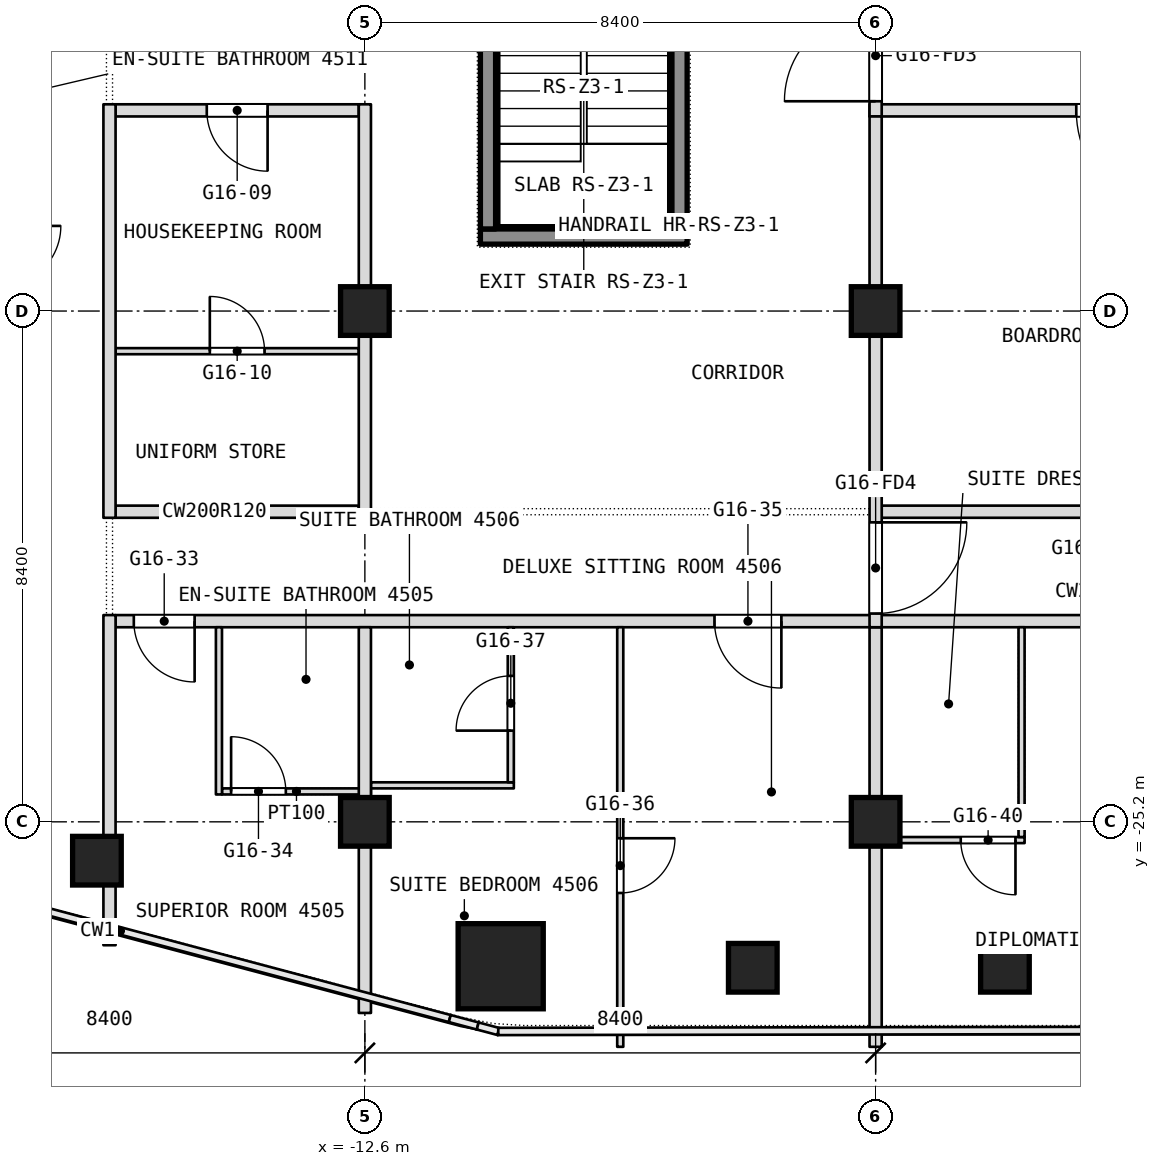
"""IFC4 building model, lengths in metres.
Left out: names, types, materials, properties, quantities, classifications, styles, units other than length and angle.
Written with IfcOpenShell. Run it as: python <this file> out.ifc"""

import sys

from ifc_helpers import new_model, si_unit, direction, frame, frame_2d, origin, origin_2d, place, context, subcontext, project, spatial, rectangle, extrude, element, fill, save


model = new_model("IFC4")
c1 = context("Model", 3, precision=1e-05, world=origin(), true_north=direction((0.0, 1.0)))
c2 = subcontext(c1, "Body", "Model", "MODEL_VIEW")
j1 = project(units=[si_unit("LENGTHUNIT", "METRE"), si_unit("PLANEANGLEUNIT", "RADIAN")], contexts=[c1])
p1 = place(None, origin())
s1 = spatial("IfcSite", under=j1, at=p1, CompositionType="ELEMENT")
p2 = place(p1, origin())
s2 = spatial("IfcBuilding", under=s1, at=p2, CompositionType="ELEMENT")
p3 = place(p2, frame((0.0, 0.0, 198.5)))
s3 = spatial("IfcBuildingStorey", under=s2, at=p3, CompositionType="ELEMENT", Elevation=198.5)
p4 = place(p3, frame((-10.366, -27.575, 0.0), z_axis=(0.0, 0.0, 1.0), x_axis=(1.0, 0.0, 0.0)))
e1 = element("IfcColumn", 1, at=p4, inside=s3, PredefinedType="COLUMN", context=c2, shape_type="SweptSolid", body=[
    extrude(rectangle(XDim=1.4, YDim=1.4, at=origin_2d()), origin(), (0.0, 0.0, 1.0), 3.6),
])
for number, where, z_axis, x_axis in (
    (2, (-12.6, -25.2, 0.0), (0.0, 0.0, 1.0), (1.0, 0.0, 0.0)),
    (3, (-12.6, -16.8, 0.0), (0.0, 0.0, 1.0), (1.0, 0.0, 0.0)),
    (4, (-4.2, -25.2, 0.0), (0.0, 0.0, 1.0), (1.0, 0.0, 0.0)),
    (5, (-4.2, -16.8, 0.0), (0.0, 0.0, 1.0), (1.0, 0.0, 0.0)),
    (6, (-2.073, -27.6, 0.0), (0.0, 0.0, 1.0), (1.0, 0.0, 0.0)),
    (7, (-6.22, -27.6, 0.0), (0.0, 0.0, 1.0), (1.0, 0.0, 0.0)),
    (8, (-17.007, -25.839, 0.0), (0.0, 0.0, 1.0), (1.0, 0.0, 0.0)),
):
    element("IfcColumn", number, at=place(p3, frame(where, z_axis=z_axis, x_axis=x_axis)), inside=s3, PredefinedType="COLUMN", context=c2, shape_type="SweptSolid", body=[
        extrude(rectangle(XDim=0.8, YDim=0.8, at=origin_2d()), origin(), (0.0, 0.0, 1.0), 3.6),
    ])
p5 = place(p3, frame((-4.1, -25.5, 0.0), z_axis=(0.0, 0.0, 1.0), x_axis=(1.0, 0.0, 0.0)))
e9 = element("IfcWall", 9, at=p5, inside=s3, PredefinedType="PARTITIONING", context=c2, shape_type="SweptSolid", body=[
    extrude(rectangle(XDim=2.35, YDim=0.1, at=frame_2d((1.175, 0.0))), origin(), (0.0, 0.0, 1.0), 3.34),
])
p6 = place(p5, frame((1.3, 0.0, 0.0)))
e10 = element("IfcOpeningElement", 10, at=p6, cuts=e9, PredefinedType="OPENING", context=c2, shape_type="SweptSolid", body=[
    extrude(rectangle(XDim=0.9, YDim=2.1, at=frame_2d((0.45, 1.05))), frame((0.0, 0.05, 0.0), z_axis=(0.0, -1.0, 0.0), x_axis=(1.0, 0.0, 0.0)), (0.0, 0.0, 1.0), 0.1),
])
p7 = place(p3, frame((-14.95, -24.7, 0.0), z_axis=(0.0, 0.0, 1.0), x_axis=(1.0, 0.0, 0.0)))
e11 = element("IfcWall", 11, at=p7, inside=s3, PredefinedType="PARTITIONING", context=c2, shape_type="SweptSolid", body=[
    extrude(rectangle(XDim=2.45, YDim=0.1, at=frame_2d((1.225, 0.0))), origin(), (0.0, 0.0, 1.0), 3.34),
])
p8 = place(p7, frame((0.15, 0.0, 0.0)))
e12 = element("IfcOpeningElement", 12, at=p8, cuts=e11, PredefinedType="OPENING", context=c2, shape_type="SweptSolid", body=[
    extrude(rectangle(XDim=0.9, YDim=2.1, at=frame_2d((0.45, 1.05))), frame((0.0, 0.05, 0.0), z_axis=(0.0, -1.0, 0.0), x_axis=(1.0, 0.0, 0.0)), (0.0, 0.0, 1.0), 0.1),
])
p9 = place(p3, frame((-12.5, -24.6, 0.0), z_axis=(0.0, 0.0, 1.0), x_axis=(1.0, 0.0, 0.0)))
e13 = element("IfcWall", 13, at=p9, inside=s3, PredefinedType="PARTITIONING", context=c2, shape_type="SweptSolid", body=[
    extrude(rectangle(XDim=2.35, YDim=0.1, at=frame_2d((1.175, 0.0))), origin(), (0.0, 0.0, 1.0), 3.34),
])
p10 = place(p3, frame((-16.7, -21.9, 0.0), z_axis=(0.0, 0.0, 1.0), x_axis=(1.0, 0.0, 0.0)))
e14 = element("IfcWall", 14, at=p10, inside=s3, PredefinedType="PARTITIONING", context=c2, shape_type="SweptSolid", body=[
    extrude(rectangle(XDim=33.4, YDim=0.2, at=frame_2d((16.7, 0.0))), origin(), (0.0, 0.0, 1.0), 3.34),
])
p11 = place(p10, frame((0.3, 0.0, 0.0)))
e15 = element("IfcOpeningElement", 15, at=p11, cuts=e14, PredefinedType="OPENING", context=c2, shape_type="SweptSolid", body=[
    extrude(rectangle(XDim=1.0, YDim=2.1, at=frame_2d((0.5, 1.05))), frame((0.0, 0.1, 0.0), z_axis=(0.0, -1.0, 0.0), x_axis=(1.0, 0.0, 0.0)), (0.0, 0.0, 1.0), 0.2),
])
p12 = place(p10, frame((9.85, 0.0, 0.0)))
e16 = element("IfcOpeningElement", 16, at=p12, cuts=e14, PredefinedType="OPENING", context=c2, shape_type="SweptSolid", body=[
    extrude(rectangle(XDim=1.1, YDim=2.1, at=frame_2d((0.55, 1.05))), frame((0.0, 0.1, 0.0), z_axis=(0.0, -1.0, 0.0), x_axis=(1.0, 0.0, 0.0)), (0.0, 0.0, 1.0), 0.2),
])
p13 = place(p10, frame((16.1, 0.0, 0.0)))
e17 = element("IfcOpeningElement", 17, at=p13, cuts=e14, PredefinedType="OPENING", context=c2, shape_type="SweptSolid", body=[
    extrude(rectangle(XDim=1.1, YDim=2.1, at=frame_2d((0.55, 1.05))), frame((0.0, 0.1, 0.0), z_axis=(0.0, -1.0, 0.0), x_axis=(1.0, 0.0, 0.0)), (0.0, 0.0, 1.0), 0.2),
])
p14 = place(p10, frame((24.6, 0.0, 0.0)))
e18 = element("IfcOpeningElement", 18, at=p14, cuts=e14, PredefinedType="OPENING", context=c2, shape_type="SweptSolid", body=[
    extrude(rectangle(XDim=1.1, YDim=2.1, at=frame_2d((0.55, 1.05))), frame((0.0, 0.1, 0.0), z_axis=(0.0, -1.0, 0.0), x_axis=(1.0, 0.0, 0.0)), (0.0, 0.0, 1.0), 0.2),
])
p15 = place(p10, frame((29.7, 0.0, 0.0)))
e19 = element("IfcOpeningElement", 19, at=p15, cuts=e14, PredefinedType="OPENING", context=c2, shape_type="SweptSolid", body=[
    extrude(rectangle(XDim=1.0, YDim=2.1, at=frame_2d((0.5, 1.05))), frame((0.0, 0.1, 0.0), z_axis=(0.0, -1.0, 0.0), x_axis=(1.0, 0.0, 0.0)), (0.0, 0.0, 1.0), 0.2),
])
p16 = place(p3, frame((-16.7, -20.1, 0.0), z_axis=(0.0, 0.0, 1.0), x_axis=(1.0, 0.0, 0.0)))
e20 = element("IfcWall", 20, at=p16, inside=s3, PredefinedType="PARTITIONING", context=c2, shape_type="SweptSolid", body=[
    extrude(rectangle(XDim=4.0, YDim=0.2, at=frame_2d((2.0, 0.0))), origin(), (0.0, 0.0, 1.0), 3.34),
])
p17 = place(p3, frame((-4.1, -20.1, 0.0), z_axis=(0.0, 0.0, 1.0), x_axis=(1.0, 0.0, 0.0)))
e21 = element("IfcWall", 21, at=p17, inside=s3, PredefinedType="PARTITIONING", context=c2, shape_type="SweptSolid", body=[
    extrude(rectangle(XDim=20.8, YDim=0.2, at=frame_2d((10.4, 0.0))), origin(), (0.0, 0.0, 1.0), 3.34),
])
p18 = place(p3, frame((-16.7, -17.46, 0.0), z_axis=(0.0, 0.0, 1.0), x_axis=(1.0, 0.0, 0.0)))
e22 = element("IfcWall", 22, at=p18, inside=s3, PredefinedType="PARTITIONING", context=c2, shape_type="SweptSolid", body=[
    extrude(rectangle(XDim=4.0, YDim=0.1, at=frame_2d((2.0, 0.0))), origin(), (0.0, 0.0, 1.0), 3.34),
])
p19 = place(p18, frame((1.55, 0.0, 0.0)))
e23 = element("IfcOpeningElement", 23, at=p19, cuts=e22, PredefinedType="OPENING", context=c2, shape_type="SweptSolid", body=[
    extrude(rectangle(XDim=0.9, YDim=2.1, at=frame_2d((0.45, 1.05))), frame((0.0, 0.05, 0.0), z_axis=(0.0, -1.0, 0.0), x_axis=(1.0, 0.0, 0.0)), (0.0, 0.0, 1.0), 0.1),
])
p20 = place(p3, frame((-16.7, -13.5, 0.0), z_axis=(0.0, 0.0, 1.0), x_axis=(1.0, 0.0, 0.0)))
e24 = element("IfcWall", 24, at=p20, inside=s3, PredefinedType="PARTITIONING", context=c2, shape_type="SweptSolid", body=[
    extrude(rectangle(XDim=4.0, YDim=0.2, at=frame_2d((2.0, 0.0))), origin(), (0.0, 0.0, 1.0), 3.34),
])
p21 = place(p20, frame((1.5, 0.0, 0.0)))
e25 = element("IfcOpeningElement", 25, at=p21, cuts=e24, PredefinedType="OPENING", context=c2, shape_type="SweptSolid", body=[
    extrude(rectangle(XDim=1.0, YDim=2.1, at=frame_2d((0.5, 1.05))), frame((0.0, 0.1, 0.0), z_axis=(0.0, -1.0, 0.0), x_axis=(1.0, 0.0, 0.0)), (0.0, 0.0, 1.0), 0.2),
])
p22 = place(p3, frame((-4.3, -13.5, 0.0), z_axis=(0.0, 0.0, 1.0), x_axis=(1.0, 0.0, 0.0)))
e26 = element("IfcWall", 26, at=p22, inside=s3, PredefinedType="PARTITIONING", context=c2, shape_type="SweptSolid", body=[
    extrude(rectangle(XDim=10.0, YDim=0.2, at=frame_2d((5.0, 0.0))), origin(), (0.0, 0.0, 1.0), 3.34),
])
p23 = place(p22, frame((3.4, 0.0, 0.0)))
e27 = element("IfcOpeningElement", 27, at=p23, cuts=e26, PredefinedType="OPENING", context=c2, shape_type="SweptSolid", body=[
    extrude(rectangle(XDim=1.8, YDim=2.1, at=frame_2d((0.9, 1.05))), frame((0.0, 0.1, 0.0), z_axis=(0.0, -1.0, 0.0), x_axis=(1.0, 0.0, 0.0)), (0.0, 0.0, 1.0), 0.2),
])
p24 = place(p22, frame((8.85, 0.0, 0.0)))
e28 = element("IfcOpeningElement", 28, at=p24, cuts=e26, PredefinedType="OPENING", context=c2, shape_type="SweptSolid", body=[
    extrude(rectangle(XDim=1.0, YDim=2.1, at=frame_2d((0.5, 1.05))), frame((0.0, 0.1, 0.0), z_axis=(0.0, -1.0, 0.0), x_axis=(1.0, 0.0, 0.0)), (0.0, 0.0, 1.0), 0.2),
])
p25 = place(p3, frame((-1.8, -25.45, 0.0), z_axis=(0.0, 0.0, 1.0), x_axis=(0.0, 1.0, 0.0)))
e29 = element("IfcWall", 29, at=p25, inside=s3, PredefinedType="PARTITIONING", context=c2, shape_type="SweptSolid", body=[
    extrude(rectangle(XDim=3.45, YDim=0.1, at=frame_2d((1.725, 0.0))), origin(), (0.0, 0.0, 1.0), 3.34),
])
p26 = place(p3, frame((-4.2, -28.9, 0.0), z_axis=(0.0, 0.0, 1.0), x_axis=(0.0, 1.0, 0.0)))
e30 = element("IfcWall", 30, at=p26, inside=s3, PredefinedType="PARTITIONING", context=c2, shape_type="SweptSolid", body=[
    extrude(rectangle(XDim=6.9, YDim=0.2, at=frame_2d((3.45, 0.0))), origin(), (0.0, 0.0, 1.0), 3.34),
])
p27 = place(p3, frame((-4.2, -13.6, 0.0), z_axis=(0.0, 0.0, 1.0), x_axis=(0.0, 1.0, 0.0)))
e31 = element("IfcWall", 31, at=p27, inside=s3, PredefinedType="PARTITIONING", context=c2, shape_type="SweptSolid", body=[
    extrude(rectangle(XDim=13.6, YDim=0.2, at=frame_2d((6.8, 0.0))), origin(), (0.0, 0.0, 1.0), 3.34),
])
p28 = place(p27, frame((11.95, 0.0, 0.0)))
e32 = element("IfcOpeningElement", 32, at=p28, cuts=e31, PredefinedType="OPENING", context=c2, shape_type="SweptSolid", body=[
    extrude(rectangle(XDim=1.5, YDim=2.1, at=frame_2d((0.75, 1.05))), frame((0.0, 0.1, 0.0), z_axis=(0.0, -1.0, 0.0), x_axis=(1.0, 0.0, 0.0)), (0.0, 0.0, 1.0), 0.2),
])
p29 = place(p27, frame((0.25, 0.0, 0.0)))
e33 = element("IfcOpeningElement", 33, at=p29, cuts=e31, PredefinedType="OPENING", context=c2, shape_type="SweptSolid", body=[
    extrude(rectangle(XDim=1.5, YDim=2.1, at=frame_2d((0.75, 1.05))), frame((0.0, 0.1, 0.0), z_axis=(0.0, -1.0, 0.0), x_axis=(1.0, 0.0, 0.0)), (0.0, 0.0, 1.0), 0.2),
])
p30 = place(p3, frame((-4.2, -22.0, 0.0), z_axis=(0.0, 0.0, 1.0), x_axis=(0.0, 1.0, 0.0)))
e34 = element("IfcWall", 34, at=p30, inside=s3, PredefinedType="PARTITIONING", context=c2, shape_type="SweptSolid", body=[
    extrude(rectangle(XDim=8.4, YDim=0.2, at=frame_2d((4.2, 0.0))), origin(), (0.0, 0.0, 1.0), 3.34),
])
p31 = place(p30, frame((0.225, 0.0, 0.0)))
e35 = element("IfcOpeningElement", 35, at=p31, cuts=e34, PredefinedType="OPENING", context=c2, shape_type="SweptSolid", body=[
    extrude(rectangle(XDim=1.5, YDim=2.1, at=frame_2d((0.75, 1.05))), frame((0.0, 0.1, 0.0), z_axis=(0.0, -1.0, 0.0), x_axis=(1.0, 0.0, 0.0)), (0.0, 0.0, 1.0), 0.2),
])
p32 = place(p3, frame((-8.4, -28.9, 0.0), z_axis=(0.0, 0.0, 1.0), x_axis=(0.0, 1.0, 0.0)))
e36 = element("IfcWall", 36, at=p32, inside=s3, PredefinedType="PARTITIONING", context=c2, shape_type="SweptSolid", body=[
    extrude(rectangle(XDim=6.9, YDim=0.1, at=frame_2d((3.45, 0.0))), origin(), (0.0, 0.0, 1.0), 3.34),
])
p33 = place(p32, frame((2.53, 0.0, 0.0)))
e37 = element("IfcOpeningElement", 37, at=p33, cuts=e36, PredefinedType="OPENING", context=c2, shape_type="SweptSolid", body=[
    extrude(rectangle(XDim=0.9, YDim=2.1, at=frame_2d((0.45, 1.05))), frame((0.0, 0.05, 0.0), z_axis=(0.0, -1.0, 0.0), x_axis=(1.0, 0.0, 0.0)), (0.0, 0.0, 1.0), 0.1),
])
p34 = place(p3, frame((-10.2, -24.55, 0.0), z_axis=(0.0, 0.0, 1.0), x_axis=(0.0, 1.0, 0.0)))
e38 = element("IfcWall", 38, at=p34, inside=s3, PredefinedType="PARTITIONING", context=c2, shape_type="SweptSolid", body=[
    extrude(rectangle(XDim=2.55, YDim=0.1, at=frame_2d((1.275, 0.0))), origin(), (0.0, 0.0, 1.0), 3.34),
])
p35 = place(p34, frame((0.85, 0.0, 0.0)))
e39 = element("IfcOpeningElement", 39, at=p35, cuts=e38, PredefinedType="OPENING", context=c2, shape_type="SweptSolid", body=[
    extrude(rectangle(XDim=0.9, YDim=2.1, at=frame_2d((0.45, 1.05))), frame((0.0, 0.05, 0.0), z_axis=(0.0, -1.0, 0.0), x_axis=(1.0, 0.0, 0.0)), (0.0, 0.0, 1.0), 0.1),
])
p36 = place(p3, frame((-12.6, -28.343, 0.0), z_axis=(0.0, 0.0, 1.0), x_axis=(0.0, 1.0, 0.0)))
e40 = element("IfcWall", 40, at=p36, inside=s3, PredefinedType="PARTITIONING", context=c2, shape_type="SweptSolid", body=[
    extrude(rectangle(XDim=6.343, YDim=0.2, at=frame_2d((3.171, 0.0))), origin(), (0.0, 0.0, 1.0), 3.34),
])
p37 = place(p3, frame((-12.6, -20.2, 0.0), z_axis=(0.0, 0.0, 1.0), x_axis=(0.0, 1.0, 0.0)))
e41 = element("IfcWall", 41, at=p37, inside=s3, PredefinedType="PARTITIONING", context=c2, shape_type="SweptSolid", body=[
    extrude(rectangle(XDim=6.8, YDim=0.2, at=frame_2d((3.4, 0.0))), origin(), (0.0, 0.0, 1.0), 3.34),
])
p38 = place(p3, frame((-15.0, -24.75, 0.0), z_axis=(0.0, 0.0, 1.0), x_axis=(0.0, 1.0, 0.0)))
e42 = element("IfcWall", 42, at=p38, inside=s3, PredefinedType="PARTITIONING", context=c2, shape_type="SweptSolid", body=[
    extrude(rectangle(XDim=2.75, YDim=0.1, at=frame_2d((1.375, 0.0))), origin(), (0.0, 0.0, 1.0), 3.34),
])
p39 = place(p3, frame((-16.8, -27.229, 0.0), z_axis=(0.0, 0.0, 1.0), x_axis=(0.0, 1.0, 0.0)))
e43 = element("IfcWall", 43, at=p39, inside=s3, PredefinedType="PARTITIONING", context=c2, shape_type="SweptSolid", body=[
    extrude(rectangle(XDim=5.429, YDim=0.2, at=frame_2d((2.714, 0.0))), origin(), (0.0, 0.0, 1.0), 3.34),
])
p40 = place(p3, frame((-16.8, -20.2, 0.0), z_axis=(0.0, 0.0, 1.0), x_axis=(0.0, 1.0, 0.0)))
e44 = element("IfcWall", 44, at=p40, inside=s3, PredefinedType="PARTITIONING", context=c2, shape_type="SweptSolid", body=[
    extrude(rectangle(XDim=6.8, YDim=0.2, at=frame_2d((3.4, 0.0))), origin(), (0.0, 0.0, 1.0), 3.34),
])
p41 = place(p3, frame((-10.7, -15.575, 0.1), z_axis=(0.0, 0.0, 1.0), x_axis=(1.0, 0.0, 0.0)))
e45 = element("IfcWall", 45, at=p41, inside=s3, PredefinedType="SHEAR", context=c2, shape_type="SweptSolid", body=[
    extrude(rectangle(XDim=3.4, YDim=0.25, at=frame_2d((1.7, 0.0))), origin(), (0.0, 0.0, 1.0), 3.6),
])
for number, where, z_axis, x_axis in (
    (46, (-10.575, -15.45, 0.1), (0.0, 0.0, 1.0), (0.0, 1.0, 0.0)),
    (47, (-7.425, -15.45, 0.1), (0.0, 0.0, 1.0), (0.0, 1.0, 0.0)),
):
    element("IfcWall", number, at=place(p3, frame(where, z_axis=z_axis, x_axis=x_axis)), inside=s3, PredefinedType="SHEAR", context=c2, shape_type="SweptSolid", body=[
        extrude(rectangle(XDim=5.7, YDim=0.25, at=frame_2d((2.85, 0.0))), origin(), (0.0, 0.0, 1.0), 3.6),
    ])
p42 = place(p6, origin())
e48 = element("IfcDoor", 48, at=p42, inside=s3, OperationType="SINGLE_SWING_RIGHT", PredefinedType="DOOR", context=c2, shape_type="SweptSolid", body=[
    extrude(rectangle(XDim=0.9, YDim=2.1, at=frame_2d((0.45, 1.05))), frame((0.0, 0.025, 0.0), z_axis=(0.0, -1.0, 0.0), x_axis=(1.0, 0.0, 0.0)), (0.0, 0.0, 1.0), 0.05),
])
fill(e10, e48)
p43 = place(p8, origin())
e49 = element("IfcDoor", 49, at=p43, inside=s3, OperationType="SINGLE_SWING_LEFT", PredefinedType="DOOR", context=c2, shape_type="SweptSolid", body=[
    extrude(rectangle(XDim=0.9, YDim=2.1, at=frame_2d((0.45, 1.05))), frame((0.0, 0.025, 0.0), z_axis=(0.0, -1.0, 0.0), x_axis=(1.0, 0.0, 0.0)), (0.0, 0.0, 1.0), 0.05),
])
fill(e12, e49)
p44 = place(p11, origin())
e50 = element("IfcDoor", 50, at=p44, inside=s3, OperationType="SINGLE_SWING_RIGHT", PredefinedType="DOOR", context=c2, shape_type="SweptSolid", body=[
    extrude(rectangle(XDim=1.0, YDim=2.1, at=frame_2d((0.5, 1.05))), frame((0.0, 0.025, 0.0), z_axis=(0.0, -1.0, 0.0), x_axis=(1.0, 0.0, 0.0)), (0.0, 0.0, 1.0), 0.05),
])
fill(e15, e50)
p45 = place(p12, origin())
e51 = element("IfcDoor", 51, at=p45, inside=s3, OperationType="SINGLE_SWING_LEFT", PredefinedType="DOOR", context=c2, shape_type="SweptSolid", body=[
    extrude(rectangle(XDim=1.1, YDim=2.1, at=frame_2d((0.55, 1.05))), frame((0.0, 0.025, 0.0), z_axis=(0.0, -1.0, 0.0), x_axis=(1.0, 0.0, 0.0)), (0.0, 0.0, 1.0), 0.05),
])
fill(e16, e51)
p46 = place(p19, origin())
e52 = element("IfcDoor", 52, at=p46, inside=s3, OperationType="SINGLE_SWING_LEFT", PredefinedType="DOOR", context=c2, shape_type="SweptSolid", body=[
    extrude(rectangle(XDim=0.9, YDim=2.1, at=frame_2d((0.45, 1.05))), frame((0.0, 0.025, 0.0), z_axis=(0.0, -1.0, 0.0), x_axis=(1.0, 0.0, 0.0)), (0.0, 0.0, 1.0), 0.05),
])
fill(e23, e52)
p47 = place(p21, origin())
e53 = element("IfcDoor", 53, at=p47, inside=s3, OperationType="SINGLE_SWING_LEFT", PredefinedType="DOOR", context=c2, shape_type="SweptSolid", body=[
    extrude(rectangle(XDim=1.0, YDim=2.1, at=frame_2d((0.5, 1.05))), frame((0.0, 0.025, 0.0), z_axis=(0.0, -1.0, 0.0), x_axis=(1.0, 0.0, 0.0)), (0.0, 0.0, 1.0), 0.05),
])
fill(e25, e53)
p48 = place(p23, origin())
e54 = element("IfcDoor", 54, at=p48, inside=s3, OperationType="DOUBLE_DOOR_SINGLE_SWING", PredefinedType="DOOR", context=c2, shape_type="SweptSolid", body=[
    extrude(rectangle(XDim=1.8, YDim=2.1, at=frame_2d((0.9, 1.05))), frame((0.0, 0.025, 0.0), z_axis=(0.0, -1.0, 0.0), x_axis=(1.0, 0.0, 0.0)), (0.0, 0.0, 1.0), 0.05),
])
fill(e27, e54)
p49 = place(p33, origin())
e55 = element("IfcDoor", 55, at=p49, inside=s3, OperationType="SINGLE_SWING_LEFT", PredefinedType="DOOR", context=c2, shape_type="SweptSolid", body=[
    extrude(rectangle(XDim=0.9, YDim=2.1, at=frame_2d((0.45, 1.05))), frame((0.0, 0.025, 0.0), z_axis=(0.0, -1.0, 0.0), x_axis=(1.0, 0.0, 0.0)), (0.0, 0.0, 1.0), 0.05),
])
fill(e37, e55)
p50 = place(p35, origin())
e56 = element("IfcDoor", 56, at=p50, inside=s3, OperationType="SINGLE_SWING_RIGHT", PredefinedType="DOOR", context=c2, shape_type="SweptSolid", body=[
    extrude(rectangle(XDim=0.9, YDim=2.1, at=frame_2d((0.45, 1.05))), frame((0.0, 0.025, 0.0), z_axis=(0.0, -1.0, 0.0), x_axis=(1.0, 0.0, 0.0)), (0.0, 0.0, 1.0), 0.05),
])
fill(e39, e56)
p51 = place(p29, origin())
e57 = element("IfcDoor", 57, at=p51, inside=s3, OperationType="DOUBLE_DOOR_DOUBLE_SWING", PredefinedType="DOOR", context=c2, shape_type="SweptSolid", body=[
    extrude(rectangle(XDim=1.5, YDim=2.1, at=frame_2d((0.75, 1.05))), frame((0.0, 0.025, 0.0), z_axis=(0.0, -1.0, 0.0), x_axis=(1.0, 0.0, 0.0)), (0.0, 0.0, 1.0), 0.05),
])
fill(e33, e57)
p52 = place(p31, origin())
e58 = element("IfcDoor", 58, at=p52, inside=s3, OperationType="DOUBLE_DOOR_DOUBLE_SWING", PredefinedType="DOOR", context=c2, shape_type="SweptSolid", body=[
    extrude(rectangle(XDim=1.5, YDim=2.1, at=frame_2d((0.75, 1.05))), frame((0.0, 0.025, 0.0), z_axis=(0.0, -1.0, 0.0), x_axis=(1.0, 0.0, 0.0)), (0.0, 0.0, 1.0), 0.05),
])
fill(e35, e58)
save(model, sys.argv[1])
